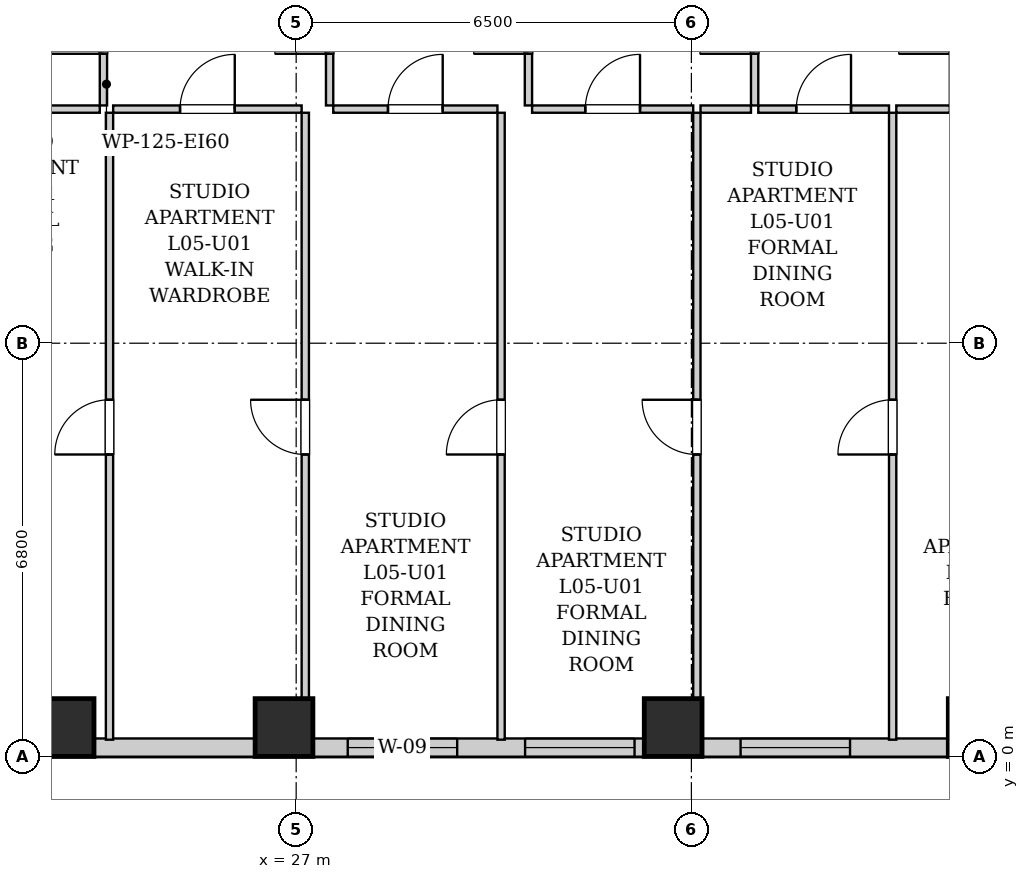
"""IFC4 building model, lengths in metres.
Left out: names, types, materials, properties, quantities, classifications, styles, units other than length and angle.
Written with IfcOpenShell. Run it as: python <this file> out.ifc"""

import sys

from ifc_helpers import new_model, si_unit, direction, frame, frame_2d, origin, origin_2d, place, context, subcontext, project, spatial, rectangle, extrude, element, fill, save


model = new_model("IFC4")
c1 = context("Model", 3, precision=1e-05, world=origin(), true_north=direction((0.0, 1.0)))
c2 = subcontext(c1, "Body", "Model", "MODEL_VIEW")
j1 = project(units=[si_unit("LENGTHUNIT", "METRE"), si_unit("PLANEANGLEUNIT", "RADIAN")], contexts=[c1])
p1 = place(None, origin())
s1 = spatial("IfcSite", under=j1, at=p1, CompositionType="ELEMENT")
p2 = place(p1, origin())
s2 = spatial("IfcBuilding", under=s1, at=p2, CompositionType="ELEMENT")
p3 = place(p2, frame((0.0, 0.0, 25.8)))
s3 = spatial("IfcBuildingStorey", under=s2, at=p3, CompositionType="ELEMENT", Elevation=25.8)
for number, where, z_axis, x_axis in (
    (1, (23.2, 0.48, 0.0), (0.0, 0.0, 1.0), (1.0, 0.0, 0.0)),
    (2, (26.8, 0.48, 0.0), (0.0, 0.0, 1.0), (1.0, 0.0, 0.0)),
    (3, (33.2, 0.48, 0.0), (0.0, 0.0, 1.0), (1.0, 0.0, 0.0)),
    (4, (38.2, 0.48, 0.0), (0.0, 0.0, 1.0), (1.0, 0.0, 0.0)),
):
    element("IfcColumn", number, at=place(p3, frame(where, z_axis=z_axis, x_axis=x_axis)), inside=s3, PredefinedType="COLUMN", context=c2, shape_type="SweptSolid", body=[
        extrude(rectangle(XDim=0.95, YDim=0.95, at=origin_2d()), origin(), (0.0, 0.0, 1.0), 3.2),
    ])
p4 = place(p3, frame((44.0, 0.15, 0.0), z_axis=(0.0, 0.0, 1.0), x_axis=(-1.0, 0.0, 0.0)))
e5 = element("IfcWall", 5, at=p4, inside=s3, PredefinedType="SOLIDWALL", context=c2, shape_type="SweptSolid", body=[
    extrude(rectangle(XDim=28.1, YDim=0.3, at=frame_2d((14.05, 0.0))), origin(), (0.0, 0.0, 1.0), 1.975),
])
p5 = place(p4, frame((26.835, 0.0, 0.55)))
e6 = element("IfcOpeningElement", 6, at=p5, cuts=e5, PredefinedType="OPENING", context=c2, shape_type="SweptSolid", body=[
    extrude(rectangle(XDim=0.85, YDim=1.2, at=frame_2d((0.425, 0.6))), frame((0.0, 0.16, 0.0), z_axis=(0.0, -1.0, 0.0), x_axis=(1.0, 0.0, 0.0)), (0.0, 0.0, 1.0), 0.32),
])
p6 = place(p4, frame((23.765, 0.0, 0.55)))
e7 = element("IfcOpeningElement", 7, at=p6, cuts=e5, PredefinedType="OPENING", context=c2, shape_type="SweptSolid", body=[
    extrude(rectangle(XDim=1.8, YDim=1.2, at=frame_2d((0.9, 0.6))), frame((0.0, 0.16, 0.0), z_axis=(0.0, -1.0, 0.0), x_axis=(1.0, 0.0, 0.0)), (0.0, 0.0, 1.0), 0.32),
])
p7 = place(p4, frame((21.5, 0.0, 0.55)))
e8 = element("IfcOpeningElement", 8, at=p7, cuts=e5, PredefinedType="OPENING", context=c2, shape_type="SweptSolid", body=[
    extrude(rectangle(XDim=1.35, YDim=1.2, at=frame_2d((0.675, 0.6))), frame((0.0, 0.16, 0.0), z_axis=(0.0, -1.0, 0.0), x_axis=(1.0, 0.0, 0.0)), (0.0, 0.0, 1.0), 0.32),
])
p8 = place(p4, frame((14.352, 0.0, 0.55)))
e9 = element("IfcOpeningElement", 9, at=p8, cuts=e5, PredefinedType="OPENING", context=c2, shape_type="SweptSolid", body=[
    extrude(rectangle(XDim=1.8, YDim=1.2, at=frame_2d((0.9, 0.6))), frame((0.0, 0.16, 0.0), z_axis=(0.0, -1.0, 0.0), x_axis=(1.0, 0.0, 0.0)), (0.0, 0.0, 1.0), 0.32),
])
p9 = place(p4, frame((11.435, 0.0, 0.55)))
e10 = element("IfcOpeningElement", 10, at=p9, cuts=e5, PredefinedType="OPENING", context=c2, shape_type="SweptSolid", body=[
    extrude(rectangle(XDim=1.8, YDim=1.2, at=frame_2d((0.9, 0.6))), frame((0.0, 0.16, 0.0), z_axis=(0.0, -1.0, 0.0), x_axis=(1.0, 0.0, 0.0)), (0.0, 0.0, 1.0), 0.32),
])
p10 = place(p4, frame((7.891, 0.0, 0.55)))
e11 = element("IfcOpeningElement", 11, at=p10, cuts=e5, PredefinedType="OPENING", context=c2, shape_type="SweptSolid", body=[
    extrude(rectangle(XDim=1.8, YDim=1.2, at=frame_2d((0.9, 0.6))), frame((0.0, 0.16, 0.0), z_axis=(0.0, -1.0, 0.0), x_axis=(1.0, 0.0, 0.0)), (0.0, 0.0, 1.0), 0.32),
])
p11 = place(p4, frame((4.315, 0.0, 0.55)))
e12 = element("IfcOpeningElement", 12, at=p11, cuts=e5, PredefinedType="OPENING", context=c2, shape_type="SweptSolid", body=[
    extrude(rectangle(XDim=0.85, YDim=1.2, at=frame_2d((0.425, 0.6))), frame((0.0, 0.16, 0.0), z_axis=(0.0, -1.0, 0.0), x_axis=(1.0, 0.0, 0.0)), (0.0, 0.0, 1.0), 0.32),
])
p12 = place(p3, frame((23.83, 10.71, 0.0), z_axis=(0.0, 0.0, 1.0), x_axis=(0.0, 1.0, 0.0)))
e13 = element("IfcWall", 13, at=p12, inside=s3, PredefinedType="PARTITIONING", context=c2, shape_type="SweptSolid", body=[
    extrude(rectangle(XDim=2.6, YDim=0.12, at=frame_2d((1.3, 0.0))), origin(), (0.0, 0.0, 1.0), 2.94),
])
p13 = place(p12, frame((0.85, 0.0, 0.0)))
e14 = element("IfcOpeningElement", 14, at=p13, cuts=e13, PredefinedType="OPENING", context=c2, shape_type="SweptSolid", body=[
    extrude(rectangle(XDim=0.9, YDim=2.05, at=frame_2d((0.45, 1.025))), frame((0.0, 0.07, 0.0), z_axis=(0.0, -1.0, 0.0), x_axis=(1.0, 0.0, 0.0)), (0.0, 0.0, 1.0), 0.14),
])
p14 = place(p3, frame((20.77, 10.65, 0.0), z_axis=(0.0, 0.0, 1.0), x_axis=(1.0, 0.0, 0.0)))
e15 = element("IfcWall", 15, at=p14, inside=s3, PredefinedType="PARTITIONING", context=c2, shape_type="SweptSolid", body=[
    extrude(rectangle(XDim=3.0, YDim=0.12, at=frame_2d((1.5, 0.0))), origin(), (0.0, 0.0, 1.0), 2.94),
])
p15 = place(p14, frame((1.05, 0.0, 0.0)))
e16 = element("IfcOpeningElement", 16, at=p15, cuts=e15, PredefinedType="OPENING", context=c2, shape_type="SweptSolid", body=[
    extrude(rectangle(XDim=0.9, YDim=2.05, at=frame_2d((0.45, 1.025))), frame((0.0, 0.07, 0.0), z_axis=(0.0, -1.0, 0.0), x_axis=(1.0, 0.0, 0.0)), (0.0, 0.0, 1.0), 0.14),
])
p16 = place(p3, frame((27.55, 10.71, 0.0), z_axis=(0.0, 0.0, 1.0), x_axis=(0.0, 1.0, 0.0)))
e17 = element("IfcWall", 17, at=p16, inside=s3, PredefinedType="PARTITIONING", context=c2, shape_type="SweptSolid", body=[
    extrude(rectangle(XDim=2.6, YDim=0.12, at=frame_2d((1.3, 0.0))), origin(), (0.0, 0.0, 1.0), 2.94),
])
p17 = place(p16, frame((0.85, 0.0, 0.0)))
e18 = element("IfcOpeningElement", 18, at=p17, cuts=e17, PredefinedType="OPENING", context=c2, shape_type="SweptSolid", body=[
    extrude(rectangle(XDim=0.9, YDim=2.05, at=frame_2d((0.45, 1.025))), frame((0.0, 0.07, 0.0), z_axis=(0.0, -1.0, 0.0), x_axis=(1.0, 0.0, 0.0)), (0.0, 0.0, 1.0), 0.14),
])
p18 = place(p3, frame((23.99, 10.65, 0.0), z_axis=(0.0, 0.0, 1.0), x_axis=(1.0, 0.0, 0.0)))
e19 = element("IfcWall", 19, at=p18, inside=s3, PredefinedType="PARTITIONING", context=c2, shape_type="SweptSolid", body=[
    extrude(rectangle(XDim=3.1, YDim=0.12, at=frame_2d((1.55, 0.0))), origin(), (0.0, 0.0, 1.0), 2.94),
])
p19 = place(p18, frame((1.1, 0.0, 0.0)))
e20 = element("IfcOpeningElement", 20, at=p19, cuts=e19, PredefinedType="OPENING", context=c2, shape_type="SweptSolid", body=[
    extrude(rectangle(XDim=0.9, YDim=2.05, at=frame_2d((0.45, 1.025))), frame((0.0, 0.07, 0.0), z_axis=(0.0, -1.0, 0.0), x_axis=(1.0, 0.0, 0.0)), (0.0, 0.0, 1.0), 0.14),
])
p20 = place(p3, frame((30.82, 10.71, 0.0), z_axis=(0.0, 0.0, 1.0), x_axis=(0.0, 1.0, 0.0)))
e21 = element("IfcWall", 21, at=p20, inside=s3, PredefinedType="PARTITIONING", context=c2, shape_type="SweptSolid", body=[
    extrude(rectangle(XDim=2.6, YDim=0.12, at=frame_2d((1.3, 0.0))), origin(), (0.0, 0.0, 1.0), 2.94),
])
p21 = place(p20, frame((0.85, 0.0, 0.0)))
e22 = element("IfcOpeningElement", 22, at=p21, cuts=e21, PredefinedType="OPENING", context=c2, shape_type="SweptSolid", body=[
    extrude(rectangle(XDim=0.9, YDim=2.05, at=frame_2d((0.45, 1.025))), frame((0.0, 0.07, 0.0), z_axis=(0.0, -1.0, 0.0), x_axis=(1.0, 0.0, 0.0)), (0.0, 0.0, 1.0), 0.14),
])
p22 = place(p3, frame((27.61, 10.65, 0.0), z_axis=(0.0, 0.0, 1.0), x_axis=(1.0, 0.0, 0.0)))
e23 = element("IfcWall", 23, at=p22, inside=s3, PredefinedType="PARTITIONING", context=c2, shape_type="SweptSolid", body=[
    extrude(rectangle(XDim=2.7, YDim=0.12, at=frame_2d((1.35, 0.0))), origin(), (0.0, 0.0, 1.0), 2.94),
])
p23 = place(p22, frame((0.9, 0.0, 0.0)))
e24 = element("IfcOpeningElement", 24, at=p23, cuts=e23, PredefinedType="OPENING", context=c2, shape_type="SweptSolid", body=[
    extrude(rectangle(XDim=0.9, YDim=2.05, at=frame_2d((0.45, 1.025))), frame((0.0, 0.07, 0.0), z_axis=(0.0, -1.0, 0.0), x_axis=(1.0, 0.0, 0.0)), (0.0, 0.0, 1.0), 0.14),
])
p24 = place(p3, frame((34.54, 10.71, 0.0), z_axis=(0.0, 0.0, 1.0), x_axis=(0.0, 1.0, 0.0)))
e25 = element("IfcWall", 25, at=p24, inside=s3, PredefinedType="PARTITIONING", context=c2, shape_type="SweptSolid", body=[
    extrude(rectangle(XDim=2.6, YDim=0.12, at=frame_2d((1.3, 0.0))), origin(), (0.0, 0.0, 1.0), 2.94),
])
p25 = place(p24, frame((0.85, 0.0, 0.0)))
e26 = element("IfcOpeningElement", 26, at=p25, cuts=e25, PredefinedType="OPENING", context=c2, shape_type="SweptSolid", body=[
    extrude(rectangle(XDim=0.9, YDim=2.05, at=frame_2d((0.45, 1.025))), frame((0.0, 0.07, 0.0), z_axis=(0.0, -1.0, 0.0), x_axis=(1.0, 0.0, 0.0)), (0.0, 0.0, 1.0), 0.14),
])
p26 = place(p3, frame((30.88, 10.65, 0.0), z_axis=(0.0, 0.0, 1.0), x_axis=(1.0, 0.0, 0.0)))
e27 = element("IfcWall", 27, at=p26, inside=s3, PredefinedType="PARTITIONING", context=c2, shape_type="SweptSolid", body=[
    extrude(rectangle(XDim=2.65, YDim=0.12, at=frame_2d((1.325, 0.0))), origin(), (0.0, 0.0, 1.0), 2.94),
])
p27 = place(p26, frame((0.875, 0.0, 0.0)))
e28 = element("IfcOpeningElement", 28, at=p27, cuts=e27, PredefinedType="OPENING", context=c2, shape_type="SweptSolid", body=[
    extrude(rectangle(XDim=0.9, YDim=2.05, at=frame_2d((0.45, 1.025))), frame((0.0, 0.07, 0.0), z_axis=(0.0, -1.0, 0.0), x_axis=(1.0, 0.0, 0.0)), (0.0, 0.0, 1.0), 0.14),
])
p28 = place(p3, frame((33.65, 10.65, 0.0), z_axis=(0.0, 0.0, 1.0), x_axis=(1.0, 0.0, 0.0)))
e29 = element("IfcWall", 29, at=p28, inside=s3, PredefinedType="PARTITIONING", context=c2, shape_type="SweptSolid", body=[
    extrude(rectangle(XDim=0.83, YDim=0.12, at=frame_2d((0.415, 0.0))), origin(), (0.0, 0.0, 1.0), 2.94),
])
p29 = place(p3, frame((34.6, 10.65, 0.0), z_axis=(0.0, 0.0, 1.0), x_axis=(1.0, 0.0, 0.0)))
e30 = element("IfcWall", 30, at=p29, inside=s3, PredefinedType="PARTITIONING", context=c2, shape_type="SweptSolid", body=[
    extrude(rectangle(XDim=2.15, YDim=0.12, at=frame_2d((1.075, 0.0))), origin(), (0.0, 0.0, 1.0), 2.94),
])
p30 = place(p29, frame((0.625, 0.0, 0.0)))
e31 = element("IfcOpeningElement", 31, at=p30, cuts=e30, PredefinedType="OPENING", context=c2, shape_type="SweptSolid", body=[
    extrude(rectangle(XDim=0.9, YDim=2.05, at=frame_2d((0.45, 1.025))), frame((0.0, 0.07, 0.0), z_axis=(0.0, -1.0, 0.0), x_axis=(1.0, 0.0, 0.0)), (0.0, 0.0, 1.0), 0.14),
])
p31 = place(p3, frame((36.87, 10.65, 0.0), z_axis=(0.0, 0.0, 1.0), x_axis=(1.0, 0.0, 0.0)))
e32 = element("IfcWall", 32, at=p31, inside=s3, PredefinedType="PARTITIONING", context=c2, shape_type="SweptSolid", body=[
    extrude(rectangle(XDim=0.88, YDim=0.12, at=frame_2d((0.44, 0.0))), origin(), (0.0, 0.0, 1.0), 2.94),
])
p32 = place(p3, frame((23.93, 0.28, 0.0), z_axis=(0.0, 0.0, 1.0), x_axis=(0.0, 1.0, 0.0)))
e33 = element("IfcWall", 33, at=p32, inside=s3, PredefinedType="PARTITIONING", context=c2, shape_type="SweptSolid", body=[
    extrude(rectangle(XDim=10.31, YDim=0.12, at=frame_2d((5.155, 0.0))), origin(), (0.0, 0.0, 1.0), 2.94),
])
p33 = place(p32, frame((4.69, 0.0, 0.0)))
e34 = element("IfcOpeningElement", 34, at=p33, cuts=e33, PredefinedType="OPENING", context=c2, shape_type="SweptSolid", body=[
    extrude(rectangle(XDim=0.9, YDim=2.05, at=frame_2d((0.45, 1.025))), frame((0.0, 0.07, 0.0), z_axis=(0.0, -1.0, 0.0), x_axis=(1.0, 0.0, 0.0)), (0.0, 0.0, 1.0), 0.14),
])
p34 = place(p3, frame((27.15, 0.28, 0.0), z_axis=(0.0, 0.0, 1.0), x_axis=(0.0, 1.0, 0.0)))
e35 = element("IfcWall", 35, at=p34, inside=s3, PredefinedType="PARTITIONING", context=c2, shape_type="SweptSolid", body=[
    extrude(rectangle(XDim=10.31, YDim=0.12, at=frame_2d((5.155, 0.0))), origin(), (0.0, 0.0, 1.0), 2.94),
])
p35 = place(p34, frame((4.69, 0.0, 0.0)))
e36 = element("IfcOpeningElement", 36, at=p35, cuts=e35, PredefinedType="OPENING", context=c2, shape_type="SweptSolid", body=[
    extrude(rectangle(XDim=0.9, YDim=2.05, at=frame_2d((0.45, 1.025))), frame((0.0, 0.07, 0.0), z_axis=(0.0, -1.0, 0.0), x_axis=(1.0, 0.0, 0.0)), (0.0, 0.0, 1.0), 0.14),
])
p36 = place(p3, frame((30.37, 0.28, 0.0), z_axis=(0.0, 0.0, 1.0), x_axis=(0.0, 1.0, 0.0)))
e37 = element("IfcWall", 37, at=p36, inside=s3, PredefinedType="PARTITIONING", context=c2, shape_type="SweptSolid", body=[
    extrude(rectangle(XDim=10.31, YDim=0.12, at=frame_2d((5.155, 0.0))), origin(), (0.0, 0.0, 1.0), 2.94),
])
p37 = place(p36, frame((4.69, 0.0, 0.0)))
e38 = element("IfcOpeningElement", 38, at=p37, cuts=e37, PredefinedType="OPENING", context=c2, shape_type="SweptSolid", body=[
    extrude(rectangle(XDim=0.9, YDim=2.05, at=frame_2d((0.45, 1.025))), frame((0.0, 0.07, 0.0), z_axis=(0.0, -1.0, 0.0), x_axis=(1.0, 0.0, 0.0)), (0.0, 0.0, 1.0), 0.14),
])
p38 = place(p3, frame((33.59, 0.28, 0.0), z_axis=(0.0, 0.0, 1.0), x_axis=(0.0, 1.0, 0.0)))
e39 = element("IfcWall", 39, at=p38, inside=s3, PredefinedType="PARTITIONING", context=c2, shape_type="SweptSolid", body=[
    extrude(rectangle(XDim=10.31, YDim=0.12, at=frame_2d((5.155, 0.0))), origin(), (0.0, 0.0, 1.0), 2.94),
])
p39 = place(p38, frame((4.69, 0.0, 0.0)))
e40 = element("IfcOpeningElement", 40, at=p39, cuts=e39, PredefinedType="OPENING", context=c2, shape_type="SweptSolid", body=[
    extrude(rectangle(XDim=0.9, YDim=2.05, at=frame_2d((0.45, 1.025))), frame((0.0, 0.07, 0.0), z_axis=(0.0, -1.0, 0.0), x_axis=(1.0, 0.0, 0.0)), (0.0, 0.0, 1.0), 0.14),
])
p40 = place(p3, frame((36.81, 0.28, 0.0), z_axis=(0.0, 0.0, 1.0), x_axis=(0.0, 1.0, 0.0)))
e41 = element("IfcWall", 41, at=p40, inside=s3, PredefinedType="PARTITIONING", context=c2, shape_type="SweptSolid", body=[
    extrude(rectangle(XDim=10.31, YDim=0.12, at=frame_2d((5.155, 0.0))), origin(), (0.0, 0.0, 1.0), 2.94),
])
p41 = place(p40, frame((4.69, 0.0, 0.0)))
e42 = element("IfcOpeningElement", 42, at=p41, cuts=e41, PredefinedType="OPENING", context=c2, shape_type="SweptSolid", body=[
    extrude(rectangle(XDim=0.9, YDim=2.05, at=frame_2d((0.45, 1.025))), frame((0.0, 0.07, 0.0), z_axis=(0.0, -1.0, 0.0), x_axis=(1.0, 0.0, 0.0)), (0.0, 0.0, 1.0), 0.14),
])
p42 = place(p13, origin())
e43 = element("IfcDoor", 43, at=p42, inside=s3, OperationType="SINGLE_SWING_LEFT", PredefinedType="DOOR", context=c2, shape_type="SweptSolid", body=[
    extrude(rectangle(XDim=0.9, YDim=2.05, at=frame_2d((0.45, 1.025))), frame((0.0, 0.025, 0.0), z_axis=(0.0, -1.0, 0.0), x_axis=(1.0, 0.0, 0.0)), (0.0, 0.0, 1.0), 0.05),
])
fill(e14, e43)
p43 = place(p17, origin())
e44 = element("IfcDoor", 44, at=p43, inside=s3, OperationType="SINGLE_SWING_LEFT", PredefinedType="DOOR", context=c2, shape_type="SweptSolid", body=[
    extrude(rectangle(XDim=0.9, YDim=2.05, at=frame_2d((0.45, 1.025))), frame((0.0, 0.025, 0.0), z_axis=(0.0, -1.0, 0.0), x_axis=(1.0, 0.0, 0.0)), (0.0, 0.0, 1.0), 0.05),
])
fill(e18, e44)
p44 = place(p19, origin())
e45 = element("IfcDoor", 45, at=p44, inside=s3, OperationType="SINGLE_SWING_RIGHT", PredefinedType="DOOR", context=c2, shape_type="SweptSolid", body=[
    extrude(rectangle(XDim=0.9, YDim=2.05, at=frame_2d((0.45, 1.025))), frame((0.0, 0.025, 0.0), z_axis=(0.0, -1.0, 0.0), x_axis=(1.0, 0.0, 0.0)), (0.0, 0.0, 1.0), 0.05),
])
fill(e20, e45)
p45 = place(p21, origin())
e46 = element("IfcDoor", 46, at=p45, inside=s3, OperationType="SINGLE_SWING_LEFT", PredefinedType="DOOR", context=c2, shape_type="SweptSolid", body=[
    extrude(rectangle(XDim=0.9, YDim=2.05, at=frame_2d((0.45, 1.025))), frame((0.0, 0.025, 0.0), z_axis=(0.0, -1.0, 0.0), x_axis=(1.0, 0.0, 0.0)), (0.0, 0.0, 1.0), 0.05),
])
fill(e22, e46)
p46 = place(p23, origin())
e47 = element("IfcDoor", 47, at=p46, inside=s3, OperationType="SINGLE_SWING_RIGHT", PredefinedType="DOOR", context=c2, shape_type="SweptSolid", body=[
    extrude(rectangle(XDim=0.9, YDim=2.05, at=frame_2d((0.45, 1.025))), frame((0.0, 0.025, 0.0), z_axis=(0.0, -1.0, 0.0), x_axis=(1.0, 0.0, 0.0)), (0.0, 0.0, 1.0), 0.05),
])
fill(e24, e47)
p47 = place(p25, origin())
e48 = element("IfcDoor", 48, at=p47, inside=s3, OperationType="SINGLE_SWING_LEFT", PredefinedType="DOOR", context=c2, shape_type="SweptSolid", body=[
    extrude(rectangle(XDim=0.9, YDim=2.05, at=frame_2d((0.45, 1.025))), frame((0.0, 0.025, 0.0), z_axis=(0.0, -1.0, 0.0), x_axis=(1.0, 0.0, 0.0)), (0.0, 0.0, 1.0), 0.05),
])
fill(e26, e48)
p48 = place(p27, origin())
e49 = element("IfcDoor", 49, at=p48, inside=s3, OperationType="SINGLE_SWING_RIGHT", PredefinedType="DOOR", context=c2, shape_type="SweptSolid", body=[
    extrude(rectangle(XDim=0.9, YDim=2.05, at=frame_2d((0.45, 1.025))), frame((0.0, 0.025, 0.0), z_axis=(0.0, -1.0, 0.0), x_axis=(1.0, 0.0, 0.0)), (0.0, 0.0, 1.0), 0.05),
])
fill(e28, e49)
p49 = place(p30, origin())
e50 = element("IfcDoor", 50, at=p49, inside=s3, OperationType="SINGLE_SWING_RIGHT", PredefinedType="DOOR", context=c2, shape_type="SweptSolid", body=[
    extrude(rectangle(XDim=0.9, YDim=2.05, at=frame_2d((0.45, 1.025))), frame((0.0, 0.025, 0.0), z_axis=(0.0, -1.0, 0.0), x_axis=(1.0, 0.0, 0.0)), (0.0, 0.0, 1.0), 0.05),
])
fill(e31, e50)
p50 = place(p33, origin())
e51 = element("IfcDoor", 51, at=p50, inside=s3, OperationType="SINGLE_SWING_LEFT", PredefinedType="DOOR", context=c2, shape_type="SweptSolid", body=[
    extrude(rectangle(XDim=0.9, YDim=2.05, at=frame_2d((0.45, 1.025))), frame((0.0, 0.025, 0.0), z_axis=(0.0, -1.0, 0.0), x_axis=(1.0, 0.0, 0.0)), (0.0, 0.0, 1.0), 0.05),
])
fill(e34, e51)
p51 = place(p35, origin())
e52 = element("IfcDoor", 52, at=p51, inside=s3, OperationType="SINGLE_SWING_RIGHT", PredefinedType="DOOR", context=c2, shape_type="SweptSolid", body=[
    extrude(rectangle(XDim=0.9, YDim=2.05, at=frame_2d((0.45, 1.025))), frame((0.0, 0.025, 0.0), z_axis=(0.0, -1.0, 0.0), x_axis=(1.0, 0.0, 0.0)), (0.0, 0.0, 1.0), 0.05),
])
fill(e36, e52)
p52 = place(p37, origin())
e53 = element("IfcDoor", 53, at=p52, inside=s3, OperationType="SINGLE_SWING_LEFT", PredefinedType="DOOR", context=c2, shape_type="SweptSolid", body=[
    extrude(rectangle(XDim=0.9, YDim=2.05, at=frame_2d((0.45, 1.025))), frame((0.0, 0.025, 0.0), z_axis=(0.0, -1.0, 0.0), x_axis=(1.0, 0.0, 0.0)), (0.0, 0.0, 1.0), 0.05),
])
fill(e38, e53)
p53 = place(p39, origin())
e54 = element("IfcDoor", 54, at=p53, inside=s3, OperationType="SINGLE_SWING_RIGHT", PredefinedType="DOOR", context=c2, shape_type="SweptSolid", body=[
    extrude(rectangle(XDim=0.9, YDim=2.05, at=frame_2d((0.45, 1.025))), frame((0.0, 0.025, 0.0), z_axis=(0.0, -1.0, 0.0), x_axis=(1.0, 0.0, 0.0)), (0.0, 0.0, 1.0), 0.05),
])
fill(e40, e54)
p54 = place(p41, origin())
e55 = element("IfcDoor", 55, at=p54, inside=s3, OperationType="SINGLE_SWING_LEFT", PredefinedType="DOOR", context=c2, shape_type="SweptSolid", body=[
    extrude(rectangle(XDim=0.9, YDim=2.05, at=frame_2d((0.45, 1.025))), frame((0.0, 0.025, 0.0), z_axis=(0.0, -1.0, 0.0), x_axis=(1.0, 0.0, 0.0)), (0.0, 0.0, 1.0), 0.05),
])
fill(e42, e55)
p55 = place(p8, origin())
e56 = element("IfcWindow", 56, at=p55, inside=s3, PartitioningType="DOUBLE_PANEL_VERTICAL", PredefinedType="WINDOW", context=c2, shape_type="SweptSolid", body=[
    extrude(rectangle(XDim=1.8, YDim=1.2, at=frame_2d((0.9, 0.6))), frame((0.0, 0.03, 0.0), z_axis=(0.0, -1.0, 0.0), x_axis=(1.0, 0.0, 0.0)), (0.0, 0.0, 1.0), 0.06),
])
fill(e9, e56)
p56 = place(p9, origin())
e57 = element("IfcWindow", 57, at=p56, inside=s3, PartitioningType="DOUBLE_PANEL_VERTICAL", PredefinedType="WINDOW", context=c2, shape_type="SweptSolid", body=[
    extrude(rectangle(XDim=1.8, YDim=1.2, at=frame_2d((0.9, 0.6))), frame((0.0, 0.03, 0.0), z_axis=(0.0, -1.0, 0.0), x_axis=(1.0, 0.0, 0.0)), (0.0, 0.0, 1.0), 0.06),
])
fill(e10, e57)
p57 = place(p10, origin())
e58 = element("IfcWindow", 58, at=p57, inside=s3, PartitioningType="DOUBLE_PANEL_VERTICAL", PredefinedType="WINDOW", context=c2, shape_type="SweptSolid", body=[
    extrude(rectangle(XDim=1.8, YDim=1.2, at=frame_2d((0.9, 0.6))), frame((0.0, 0.03, 0.0), z_axis=(0.0, -1.0, 0.0), x_axis=(1.0, 0.0, 0.0)), (0.0, 0.0, 1.0), 0.06),
])
fill(e11, e58)
save(model, sys.argv[1])
